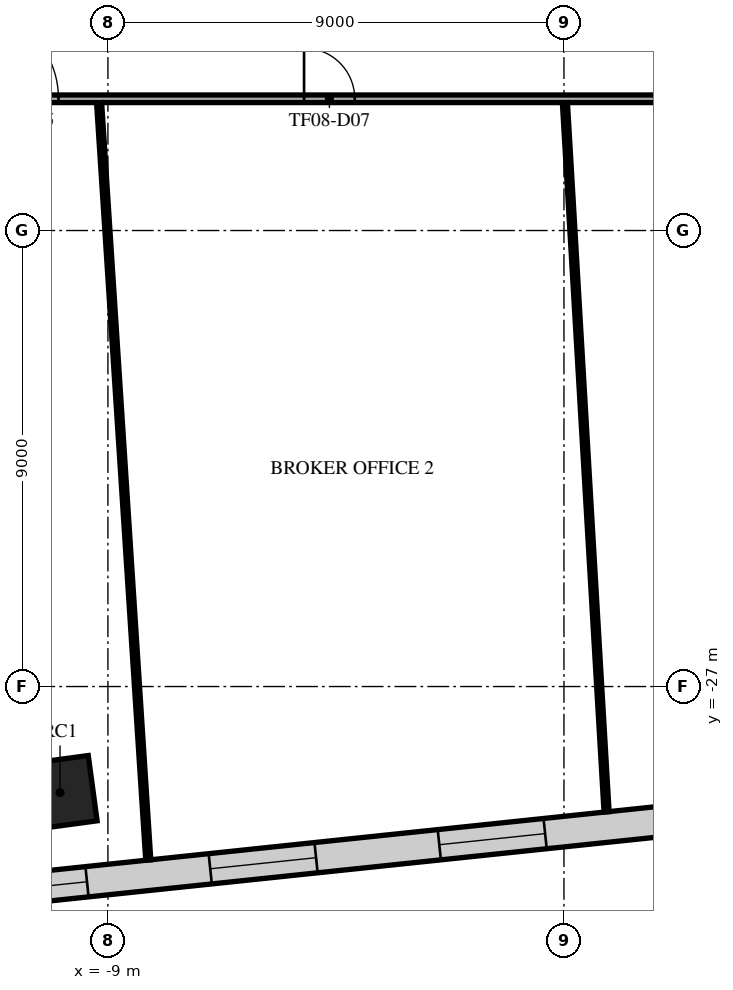
"""IFC4 building model, lengths in metres.
Left out: names, types, materials, properties, quantities, classifications, styles, units other than length and angle.
Written with IfcOpenShell. Run it as: python <this file> out.ifc"""

import sys

from ifc_helpers import new_model, si_unit, direction, frame, frame_2d, origin, origin_2d, place, context, subcontext, project, spatial, rectangle, extrude, element, fill, save


model = new_model("IFC4")
c1 = context("Model", 3, precision=1e-05, world=origin(), true_north=direction((0.0, 1.0)))
c2 = subcontext(c1, "Body", "Model", "MODEL_VIEW")
j1 = project(units=[si_unit("LENGTHUNIT", "METRE"), si_unit("PLANEANGLEUNIT", "RADIAN")], contexts=[c1])
p1 = place(None, origin())
s1 = spatial("IfcSite", under=j1, at=p1, CompositionType="ELEMENT")
p2 = place(p1, origin())
s2 = spatial("IfcBuilding", under=s1, at=p2, CompositionType="ELEMENT")
p3 = place(p2, frame((0.0, 0.0, 36.9)))
s3 = spatial("IfcBuildingStorey", under=s2, at=p3, CompositionType="ELEMENT", Elevation=36.9)
p4 = place(p3, frame((-9.945, -29.093, 0.0), z_axis=(0.0, 0.0, 1.0), x_axis=(0.991001197216, 0.133853005627, 0.0)))
e1 = element("IfcColumn", 1, at=p4, inside=s3, PredefinedType="COLUMN", context=c2, shape_type="SweptSolid", body=[
    extrude(rectangle(XDim=1.3, YDim=1.3, at=origin_2d()), origin(), (0.0, 0.0, 1.0), 4.8),
])
p5 = place(p3, frame((-21.635, -32.137, 0.0), z_axis=(0.0, 0.0, 1.0), x_axis=(0.994521923397, 0.104528196591, 0.0)))
e2 = element("IfcWall", 2, at=p5, inside=s3, PredefinedType="STANDARD", context=c2, shape_type="SweptSolid", body=[
    extrude(rectangle(XDim=49.751, YDim=0.6, at=frame_2d((24.876, 0.0))), origin(), (0.0, 0.0, 1.0), 4.35),
])
p6 = place(p5, frame((1.161, 0.0, 0.9)))
e3 = element("IfcOpeningElement", 3, at=p6, cuts=e2, PredefinedType="OPENING", context=c2, shape_type="SweptSolid", body=[
    extrude(rectangle(XDim=2.1, YDim=2.7, at=frame_2d((1.05, 1.35))), frame((0.0, 0.31, 0.0), z_axis=(0.0, -1.0, 0.0), x_axis=(1.0, 0.0, 0.0)), (0.0, 0.0, 1.0), 0.62),
])
p7 = place(p5, frame((5.644, 0.0, 0.9)))
e4 = element("IfcOpeningElement", 4, at=p7, cuts=e2, PredefinedType="OPENING", context=c2, shape_type="SweptSolid", body=[
    extrude(rectangle(XDim=2.1, YDim=2.7, at=frame_2d((1.05, 1.35))), frame((0.0, 0.31, 0.0), z_axis=(0.0, -1.0, 0.0), x_axis=(1.0, 0.0, 0.0)), (0.0, 0.0, 1.0), 0.62),
])
p8 = place(p5, frame((10.189, 0.0, 0.9)))
e5 = element("IfcOpeningElement", 5, at=p8, cuts=e2, PredefinedType="OPENING", context=c2, shape_type="SweptSolid", body=[
    extrude(rectangle(XDim=2.1, YDim=2.7, at=frame_2d((1.05, 1.35))), frame((0.0, 0.31, 0.0), z_axis=(0.0, -1.0, 0.0), x_axis=(1.0, 0.0, 0.0)), (0.0, 0.0, 1.0), 0.62),
])
p9 = place(p5, frame((14.735, 0.0, 0.9)))
e6 = element("IfcOpeningElement", 6, at=p9, cuts=e2, PredefinedType="OPENING", context=c2, shape_type="SweptSolid", body=[
    extrude(rectangle(XDim=2.1, YDim=2.7, at=frame_2d((1.05, 1.35))), frame((0.0, 0.31, 0.0), z_axis=(0.0, -1.0, 0.0), x_axis=(1.0, 0.0, 0.0)), (0.0, 0.0, 1.0), 0.62),
])
p10 = place(p5, frame((19.28, 0.0, 0.9)))
e7 = element("IfcOpeningElement", 7, at=p10, cuts=e2, PredefinedType="OPENING", context=c2, shape_type="SweptSolid", body=[
    extrude(rectangle(XDim=2.1, YDim=2.7, at=frame_2d((1.05, 1.35))), frame((0.0, 0.31, 0.0), z_axis=(0.0, -1.0, 0.0), x_axis=(1.0, 0.0, 0.0)), (0.0, 0.0, 1.0), 0.62),
])
p11 = place(p5, frame((23.826, 0.0, 0.9)))
e8 = element("IfcOpeningElement", 8, at=p11, cuts=e2, PredefinedType="OPENING", context=c2, shape_type="SweptSolid", body=[
    extrude(rectangle(XDim=2.1, YDim=2.7, at=frame_2d((1.05, 1.35))), frame((0.0, 0.31, 0.0), z_axis=(0.0, -1.0, 0.0), x_axis=(1.0, 0.0, 0.0)), (0.0, 0.0, 1.0), 0.62),
])
p12 = place(p5, frame((28.371, 0.0, 0.9)))
e9 = element("IfcOpeningElement", 9, at=p12, cuts=e2, PredefinedType="OPENING", context=c2, shape_type="SweptSolid", body=[
    extrude(rectangle(XDim=2.1, YDim=2.7, at=frame_2d((1.05, 1.35))), frame((0.0, 0.31, 0.0), z_axis=(0.0, -1.0, 0.0), x_axis=(1.0, 0.0, 0.0)), (0.0, 0.0, 1.0), 0.62),
])
p13 = place(p5, frame((32.917, 0.0, 0.9)))
e10 = element("IfcOpeningElement", 10, at=p13, cuts=e2, PredefinedType="OPENING", context=c2, shape_type="SweptSolid", body=[
    extrude(rectangle(XDim=2.1, YDim=2.7, at=frame_2d((1.05, 1.35))), frame((0.0, 0.31, 0.0), z_axis=(0.0, -1.0, 0.0), x_axis=(1.0, 0.0, 0.0)), (0.0, 0.0, 1.0), 0.62),
])
p14 = place(p5, frame((37.462, 0.0, 0.9)))
e11 = element("IfcOpeningElement", 11, at=p14, cuts=e2, PredefinedType="OPENING", context=c2, shape_type="SweptSolid", body=[
    extrude(rectangle(XDim=2.1, YDim=2.7, at=frame_2d((1.05, 1.35))), frame((0.0, 0.31, 0.0), z_axis=(0.0, -1.0, 0.0), x_axis=(1.0, 0.0, 0.0)), (0.0, 0.0, 1.0), 0.62),
])
p15 = place(p5, frame((42.008, 0.0, 0.9)))
e12 = element("IfcOpeningElement", 12, at=p15, cuts=e2, PredefinedType="OPENING", context=c2, shape_type="SweptSolid", body=[
    extrude(rectangle(XDim=2.1, YDim=2.7, at=frame_2d((1.05, 1.35))), frame((0.0, 0.31, 0.0), z_axis=(0.0, -1.0, 0.0), x_axis=(1.0, 0.0, 0.0)), (0.0, 0.0, 1.0), 0.62),
])
p16 = place(p5, frame((46.491, 0.0, 0.9)))
e13 = element("IfcOpeningElement", 13, at=p16, cuts=e2, PredefinedType="OPENING", context=c2, shape_type="SweptSolid", body=[
    extrude(rectangle(XDim=2.1, YDim=2.7, at=frame_2d((1.05, 1.35))), frame((0.0, 0.31, 0.0), z_axis=(0.0, -1.0, 0.0), x_axis=(1.0, 0.0, 0.0)), (0.0, 0.0, 1.0), 0.62),
])
p17 = place(p3, frame((-15.325, -15.4, 0.0), z_axis=(0.0, 0.0, 1.0), x_axis=(1.0, 0.0, 0.0)))
e14 = element("IfcWall", 14, at=p17, inside=s3, PredefinedType="PARTITIONING", context=c2, shape_type="SweptSolid", body=[
    extrude(rectangle(XDim=30.725, YDim=0.15, at=frame_2d((15.362, 0.0))), origin(), (0.0, 0.0, 1.0), 3.85),
])
p18 = place(p17, frame((3.55, 0.0, 0.0)))
e15 = element("IfcOpeningElement", 15, at=p18, cuts=e14, PredefinedType="OPENING", context=c2, shape_type="SweptSolid", body=[
    extrude(rectangle(XDim=1.8, YDim=2.1, at=frame_2d((0.9, 1.05))), frame((0.0, 0.085, 0.0), z_axis=(0.0, -1.0, 0.0), x_axis=(1.0, 0.0, 0.0)), (0.0, 0.0, 1.0), 0.17),
])
p19 = place(p17, frame((10.196, 0.0, 0.0)))
e16 = element("IfcOpeningElement", 16, at=p19, cuts=e14, PredefinedType="OPENING", context=c2, shape_type="SweptSolid", body=[
    extrude(rectangle(XDim=1.0, YDim=2.1, at=frame_2d((0.5, 1.05))), frame((0.0, 0.085, 0.0), z_axis=(0.0, -1.0, 0.0), x_axis=(1.0, 0.0, 0.0)), (0.0, 0.0, 1.0), 0.17),
])
p20 = place(p17, frame((17.638, 0.0, 0.0)))
e17 = element("IfcOpeningElement", 17, at=p20, cuts=e14, PredefinedType="OPENING", context=c2, shape_type="SweptSolid", body=[
    extrude(rectangle(XDim=1.0, YDim=2.1, at=frame_2d((0.5, 1.05))), frame((0.0, 0.085, 0.0), z_axis=(0.0, -1.0, 0.0), x_axis=(1.0, 0.0, 0.0)), (0.0, 0.0, 1.0), 0.17),
])
p21 = place(p17, frame((23.478, 0.0, 0.0)))
e18 = element("IfcOpeningElement", 18, at=p21, cuts=e14, PredefinedType="OPENING", context=c2, shape_type="SweptSolid", body=[
    extrude(rectangle(XDim=1.8, YDim=2.1, at=frame_2d((0.9, 1.05))), frame((0.0, 0.085, 0.0), z_axis=(0.0, -1.0, 0.0), x_axis=(1.0, 0.0, 0.0)), (0.0, 0.0, 1.0), 0.17),
])
p22 = place(p17, frame((29.228, 0.0, 0.0)))
e19 = element("IfcOpeningElement", 19, at=p22, cuts=e14, PredefinedType="OPENING", context=c2, shape_type="SweptSolid", body=[
    extrude(rectangle(XDim=1.0, YDim=2.1, at=frame_2d((0.5, 1.05))), frame((0.0, 0.085, 0.0), z_axis=(0.0, -1.0, 0.0), x_axis=(1.0, 0.0, 0.0)), (0.0, 0.0, 1.0), 0.17),
])
p23 = place(p3, frame((-9.174, -15.478, 0.0), z_axis=(0.0, 0.0, 1.0), x_axis=(0.064755162469, -0.997901181948, 0.0)))
e20 = element("IfcWall", 20, at=p23, inside=s3, PredefinedType="PARTITIONING", context=c2, shape_type="SweptSolid", body=[
    extrude(rectangle(XDim=14.975, YDim=0.1, at=frame_2d((7.488, 0.0))), origin(), (0.0, 0.0, 1.0), 3.55),
])
p24 = place(p3, frame((0.019, -15.478, 0.0), z_axis=(0.0, 0.0, 1.0), x_axis=(0.058657702067, -0.998278154618, 0.0)))
e21 = element("IfcWall", 21, at=p24, inside=s3, PredefinedType="PARTITIONING", context=c2, shape_type="SweptSolid", body=[
    extrude(rectangle(XDim=14.018, YDim=0.1, at=frame_2d((7.009, 0.0))), origin(), (0.0, 0.0, 1.0), 3.55),
])
p25 = place(p8, origin())
e22 = element("IfcWindow", 22, at=p25, inside=s3, PartitioningType="SINGLE_PANEL", PredefinedType="WINDOW", context=c2, shape_type="SweptSolid", body=[
    extrude(rectangle(XDim=2.1, YDim=2.7, at=frame_2d((1.05, 1.35))), frame((0.0, 0.03, 0.0), z_axis=(0.0, -1.0, 0.0), x_axis=(1.0, 0.0, 0.0)), (0.0, 0.0, 1.0), 0.06),
])
fill(e5, e22)
p26 = place(p9, origin())
e23 = element("IfcWindow", 23, at=p26, inside=s3, PartitioningType="SINGLE_PANEL", PredefinedType="WINDOW", context=c2, shape_type="SweptSolid", body=[
    extrude(rectangle(XDim=2.1, YDim=2.7, at=frame_2d((1.05, 1.35))), frame((0.0, 0.03, 0.0), z_axis=(0.0, -1.0, 0.0), x_axis=(1.0, 0.0, 0.0)), (0.0, 0.0, 1.0), 0.06),
])
fill(e6, e23)
p27 = place(p10, origin())
e24 = element("IfcWindow", 24, at=p27, inside=s3, PartitioningType="SINGLE_PANEL", PredefinedType="WINDOW", context=c2, shape_type="SweptSolid", body=[
    extrude(rectangle(XDim=2.1, YDim=2.7, at=frame_2d((1.05, 1.35))), frame((0.0, 0.03, 0.0), z_axis=(0.0, -1.0, 0.0), x_axis=(1.0, 0.0, 0.0)), (0.0, 0.0, 1.0), 0.06),
])
fill(e7, e24)
p28 = place(p18, frame((1.8, 0.0, 0.0), z_axis=(0.0, 0.0, 1.0), x_axis=(-1.0, 0.0, 0.0)))
e25 = element("IfcDoor", 25, at=p28, inside=s3, OperationType="DOUBLE_DOOR_SINGLE_SWING", PredefinedType="DOOR", context=c2, shape_type="SweptSolid", body=[
    extrude(rectangle(XDim=1.8, YDim=2.1, at=frame_2d((0.9, 1.05))), frame((0.0, 0.025, 0.0), z_axis=(0.0, -1.0, 0.0), x_axis=(1.0, 0.0, 0.0)), (0.0, 0.0, 1.0), 0.05),
])
fill(e15, e25)
p29 = place(p19, frame((1.0, 0.0, 0.0), z_axis=(0.0, 0.0, 1.0), x_axis=(-1.0, 0.0, 0.0)))
e26 = element("IfcDoor", 26, at=p29, inside=s3, OperationType="SINGLE_SWING_RIGHT", PredefinedType="DOOR", context=c2, shape_type="SweptSolid", body=[
    extrude(rectangle(XDim=1.0, YDim=2.1, at=frame_2d((0.5, 1.05))), frame((0.0, 0.025, 0.0), z_axis=(0.0, -1.0, 0.0), x_axis=(1.0, 0.0, 0.0)), (0.0, 0.0, 1.0), 0.05),
])
fill(e16, e26)
save(model, sys.argv[1])
